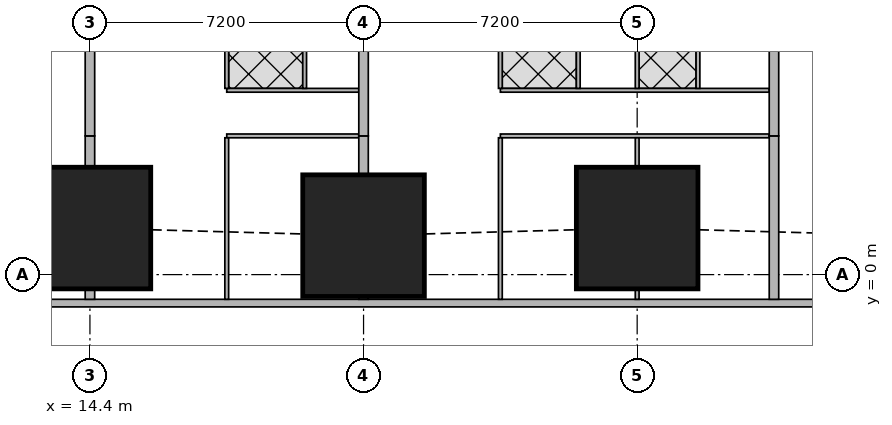
"""IFC4 building model, lengths in metres.
Left out: names, types, materials, properties, quantities, classifications, styles, units other than length and angle.
Written with IfcOpenShell. Run it as: python <this file> out.ifc"""

import sys

from ifc_helpers import new_model, si_unit, direction, frame, frame_2d, origin, origin_2d, place, context, subcontext, project, spatial, rectangle, extrude, element, fill, save


model = new_model("IFC4")
c1 = context("Model", 3, precision=1e-05, world=origin(), true_north=direction((0.0, 1.0)))
c2 = subcontext(c1, "Body", "Model", "MODEL_VIEW")
j1 = project(units=[si_unit("LENGTHUNIT", "METRE"), si_unit("PLANEANGLEUNIT", "RADIAN")], contexts=[c1])
p1 = place(None, origin())
s1 = spatial("IfcSite", under=j1, at=p1, CompositionType="ELEMENT")
p2 = place(p1, origin())
s2 = spatial("IfcBuilding", under=s1, at=p2, CompositionType="ELEMENT")
p3 = place(p2, frame((0.0, 0.0, 20.0)))
s3 = spatial("IfcBuildingStorey", under=s2, at=p3, CompositionType="ELEMENT", Elevation=20.0)
p4 = place(p3, frame((14.4, 1.225, 0.0), z_axis=(0.0, 0.0, 1.0), x_axis=(1.0, 0.0, 0.0)))
e1 = element("IfcColumn", 1, at=p4, inside=s3, PredefinedType="COLUMN", context=c2, shape_type="SweptSolid", body=[
    extrude(rectangle(XDim=3.2, YDim=3.2, at=origin_2d()), origin(), (0.0, 0.0, 1.0), 3.75),
])
p5 = place(p3, frame((21.6, 1.025, -0.3), z_axis=(0.0, 0.0, 1.0), x_axis=(1.0, 0.0, 0.0)))
e2 = element("IfcColumn", 2, at=p5, inside=s3, PredefinedType="COLUMN", context=c2, shape_type="SweptSolid", body=[
    extrude(rectangle(XDim=3.2, YDim=3.2, at=origin_2d()), origin(), (0.0, 0.0, 1.0), 4.05),
])
p6 = place(p3, frame((28.8, 1.225, 0.0), z_axis=(0.0, 0.0, 1.0), x_axis=(1.0, 0.0, 0.0)))
e3 = element("IfcColumn", 3, at=p6, inside=s3, PredefinedType="COLUMN", context=c2, shape_type="SweptSolid", body=[
    extrude(rectangle(XDim=3.2, YDim=3.2, at=origin_2d()), origin(), (0.0, 0.0, 1.0), 3.75),
])
p7 = place(p3, frame((2.163, -0.75, 0.0), z_axis=(0.0, 0.0, 1.0), x_axis=(1.0, 0.0, 0.0)))
e4 = element("IfcWall", 4, at=p7, inside=s3, PredefinedType="SOLIDWALL", context=c2, shape_type="SweptSolid", body=[
    extrude(rectangle(XDim=45.628, YDim=0.2, at=frame_2d((22.814, 0.0))), origin(), (0.0, 0.0, 1.0), 3.5),
])
p8 = place(p7, frame((9.537, 0.0, 0.9)))
e5 = element("IfcOpeningElement", 5, at=p8, cuts=e4, PredefinedType="OPENING", context=c2, shape_type="SweptSolid", body=[
    extrude(rectangle(XDim=1.8, YDim=1.5, at=frame_2d((0.9, 0.75))), frame((0.0, 0.11, 0.0), z_axis=(0.0, -1.0, 0.0), x_axis=(1.0, 0.0, 0.0)), (0.0, 0.0, 1.0), 0.22),
])
p9 = place(p7, frame((13.137, 0.0, 0.9)))
e6 = element("IfcOpeningElement", 6, at=p9, cuts=e4, PredefinedType="OPENING", context=c2, shape_type="SweptSolid", body=[
    extrude(rectangle(XDim=1.8, YDim=1.5, at=frame_2d((0.9, 0.75))), frame((0.0, 0.11, 0.0), z_axis=(0.0, -1.0, 0.0), x_axis=(1.0, 0.0, 0.0)), (0.0, 0.0, 1.0), 0.22),
])
p10 = place(p7, frame((16.737, 0.0, 0.9)))
e7 = element("IfcOpeningElement", 7, at=p10, cuts=e4, PredefinedType="OPENING", context=c2, shape_type="SweptSolid", body=[
    extrude(rectangle(XDim=1.8, YDim=1.5, at=frame_2d((0.9, 0.75))), frame((0.0, 0.11, 0.0), z_axis=(0.0, -1.0, 0.0), x_axis=(1.0, 0.0, 0.0)), (0.0, 0.0, 1.0), 0.22),
])
p11 = place(p7, frame((20.337, 0.0, 0.9)))
e8 = element("IfcOpeningElement", 8, at=p11, cuts=e4, PredefinedType="OPENING", context=c2, shape_type="SweptSolid", body=[
    extrude(rectangle(XDim=1.8, YDim=1.5, at=frame_2d((0.9, 0.75))), frame((0.0, 0.11, 0.0), z_axis=(0.0, -1.0, 0.0), x_axis=(1.0, 0.0, 0.0)), (0.0, 0.0, 1.0), 0.22),
])
p12 = place(p7, frame((23.937, 0.0, 0.9)))
e9 = element("IfcOpeningElement", 9, at=p12, cuts=e4, PredefinedType="OPENING", context=c2, shape_type="SweptSolid", body=[
    extrude(rectangle(XDim=1.8, YDim=1.5, at=frame_2d((0.9, 0.75))), frame((0.0, 0.11, 0.0), z_axis=(0.0, -1.0, 0.0), x_axis=(1.0, 0.0, 0.0)), (0.0, 0.0, 1.0), 0.22),
])
p13 = place(p7, frame((27.537, 0.0, 0.9)))
e10 = element("IfcOpeningElement", 10, at=p13, cuts=e4, PredefinedType="OPENING", context=c2, shape_type="SweptSolid", body=[
    extrude(rectangle(XDim=1.8, YDim=1.5, at=frame_2d((0.9, 0.75))), frame((0.0, 0.11, 0.0), z_axis=(0.0, -1.0, 0.0), x_axis=(1.0, 0.0, 0.0)), (0.0, 0.0, 1.0), 0.22),
])
p14 = place(p7, frame((31.137, 0.0, 0.9)))
e11 = element("IfcOpeningElement", 11, at=p14, cuts=e4, PredefinedType="OPENING", context=c2, shape_type="SweptSolid", body=[
    extrude(rectangle(XDim=1.8, YDim=1.5, at=frame_2d((0.9, 0.75))), frame((0.0, 0.11, 0.0), z_axis=(0.0, -1.0, 0.0), x_axis=(1.0, 0.0, 0.0)), (0.0, 0.0, 1.0), 0.22),
])
p15 = place(p7, frame((34.737, 0.0, 0.9)))
e12 = element("IfcOpeningElement", 12, at=p15, cuts=e4, PredefinedType="OPENING", context=c2, shape_type="SweptSolid", body=[
    extrude(rectangle(XDim=1.8, YDim=1.5, at=frame_2d((0.9, 0.75))), frame((0.0, 0.11, 0.0), z_axis=(0.0, -1.0, 0.0), x_axis=(1.0, 0.0, 0.0)), (0.0, 0.0, 1.0), 0.22),
])
p16 = place(p3, frame((21.475, 3.65, 0.0), z_axis=(0.0, 0.0, 1.0), x_axis=(-1.0, 0.0, 0.0)))
e13 = element("IfcWall", 13, at=p16, inside=s3, PredefinedType="PARTITIONING", context=c2, shape_type="SweptSolid", body=[
    extrude(rectangle(XDim=3.475, YDim=0.1, at=frame_2d((1.738, 0.0))), origin(), (0.0, 0.0, 1.0), 3.5),
])
p17 = place(p16, frame((2.375, 0.0, 0.0)))
e14 = element("IfcOpeningElement", 14, at=p17, cuts=e13, PredefinedType="OPENING", context=c2, shape_type="SweptSolid", body=[
    extrude(rectangle(XDim=0.9, YDim=2.1, at=frame_2d((0.45, 1.05))), frame((0.0, 0.06, 0.0), z_axis=(0.0, -1.0, 0.0), x_axis=(1.0, 0.0, 0.0)), (0.0, 0.0, 1.0), 0.12),
])
p18 = place(p3, frame((21.475, 4.85, 0.0), z_axis=(0.0, 0.0, 1.0), x_axis=(-1.0, 0.0, 0.0)))
e15 = element("IfcWall", 15, at=p18, inside=s3, PredefinedType="PARTITIONING", context=c2, shape_type="SweptSolid", body=[
    extrude(rectangle(XDim=3.475, YDim=0.1, at=frame_2d((1.738, 0.0))), origin(), (0.0, 0.0, 1.0), 3.5),
])
p19 = place(p18, frame((2.0, 0.0, 0.0)))
e16 = element("IfcOpeningElement", 16, at=p19, cuts=e15, PredefinedType="OPENING", context=c2, shape_type="SweptSolid", body=[
    extrude(rectangle(XDim=0.9, YDim=2.1, at=frame_2d((0.45, 1.05))), frame((0.0, 0.06, 0.0), z_axis=(0.0, -1.0, 0.0), x_axis=(1.0, 0.0, 0.0)), (0.0, 0.0, 1.0), 0.12),
])
p20 = place(p18, frame((0.2, 0.0, 0.0)))
e17 = element("IfcOpeningElement", 17, at=p20, cuts=e15, PredefinedType="OPENING", context=c2, shape_type="SweptSolid", body=[
    extrude(rectangle(XDim=0.9, YDim=2.1, at=frame_2d((0.45, 1.05))), frame((0.0, 0.06, 0.0), z_axis=(0.0, -1.0, 0.0), x_axis=(1.0, 0.0, 0.0)), (0.0, 0.0, 1.0), 0.12),
])
p21 = place(p3, frame((18.0, -0.65, 0.0), z_axis=(0.0, 0.0, 1.0), x_axis=(0.0, 1.0, 0.0)))
e18 = element("IfcWall", 18, at=p21, inside=s3, PredefinedType="PARTITIONING", context=c2, shape_type="SweptSolid", body=[
    extrude(rectangle(XDim=4.25, YDim=0.1, at=frame_2d((2.125, 0.0))), origin(), (0.0, 0.0, 1.0), 2.05),
])
for number, where, z_axis, x_axis in (
    (19, (18.0, 4.9, 0.0), (0.0, 0.0, 1.0), (0.0, 1.0, 0.0)),
    (20, (20.05, 4.9, 0.0), (0.0, 0.0, 1.0), (0.0, 1.0, 0.0)),
):
    element("IfcWall", number, at=place(p3, frame(where, z_axis=z_axis, x_axis=x_axis)), inside=s3, PredefinedType="PARTITIONING", context=c2, shape_type="SweptSolid", body=[
        extrude(rectangle(XDim=3.525, YDim=0.1, at=frame_2d((1.763, 0.0))), origin(), (0.0, 0.0, 1.0), 3.5),
    ])
p22 = place(p3, frame((14.4, -0.65, 0.0), z_axis=(0.0, 0.0, 1.0), x_axis=(0.0, 1.0, 0.0)))
e21 = element("IfcWall", 21, at=p22, inside=s3, PredefinedType="SOLIDWALL", context=c2, shape_type="SweptSolid", body=[
    extrude(rectangle(XDim=0.274, YDim=0.25, at=frame_2d((0.137, 0.0))), origin(), (0.0, 0.0, 1.0), 2.05),
])
p23 = place(p3, frame((14.4, 2.826, 0.0), z_axis=(0.0, 0.0, 1.0), x_axis=(0.0, 1.0, 0.0)))
e22 = element("IfcWall", 22, at=p23, inside=s3, PredefinedType="SOLIDWALL", context=c2, shape_type="SweptSolid", body=[
    extrude(rectangle(XDim=0.824, YDim=0.25, at=frame_2d((0.412, 0.0))), origin(), (0.0, 0.0, 1.0), 2.05),
])
p24 = place(p3, frame((14.4, 3.65, 0.0), z_axis=(0.0, 0.0, 1.0), x_axis=(0.0, 1.0, 0.0)))
e23 = element("IfcWall", 23, at=p24, inside=s3, PredefinedType="SOLIDWALL", context=c2, shape_type="SweptSolid", body=[
    extrude(rectangle(XDim=2.949, YDim=0.25, at=frame_2d((1.475, 0.0))), origin(), (0.0, 0.0, 1.0), 3.5),
])
p25 = place(p3, frame((32.275, 3.65, 0.0), z_axis=(0.0, 0.0, 1.0), x_axis=(-1.0, 0.0, 0.0)))
e24 = element("IfcWall", 24, at=p25, inside=s3, PredefinedType="PARTITIONING", context=c2, shape_type="SweptSolid", body=[
    extrude(rectangle(XDim=7.075, YDim=0.1, at=frame_2d((3.538, 0.0))), origin(), (0.0, 0.0, 1.0), 3.5),
])
p26 = place(p25, frame((5.975, 0.0, 0.0)))
e25 = element("IfcOpeningElement", 25, at=p26, cuts=e24, PredefinedType="OPENING", context=c2, shape_type="SweptSolid", body=[
    extrude(rectangle(XDim=0.9, YDim=2.1, at=frame_2d((0.45, 1.05))), frame((0.0, 0.06, 0.0), z_axis=(0.0, -1.0, 0.0), x_axis=(1.0, 0.0, 0.0)), (0.0, 0.0, 1.0), 0.12),
])
p27 = place(p25, frame((0.95, 0.0, 0.0)))
e26 = element("IfcOpeningElement", 26, at=p27, cuts=e24, PredefinedType="OPENING", context=c2, shape_type="SweptSolid", body=[
    extrude(rectangle(XDim=0.9, YDim=2.1, at=frame_2d((0.45, 1.05))), frame((0.0, 0.06, 0.0), z_axis=(0.0, -1.0, 0.0), x_axis=(1.0, 0.0, 0.0)), (0.0, 0.0, 1.0), 0.12),
])
p28 = place(p3, frame((32.275, 4.85, 0.0), z_axis=(0.0, 0.0, 1.0), x_axis=(-1.0, 0.0, 0.0)))
e27 = element("IfcWall", 27, at=p28, inside=s3, PredefinedType="PARTITIONING", context=c2, shape_type="SweptSolid", body=[
    extrude(rectangle(XDim=7.075, YDim=0.1, at=frame_2d((3.538, 0.0))), origin(), (0.0, 0.0, 1.0), 3.5),
])
p29 = place(p28, frame((5.6, 0.0, 0.0)))
e28 = element("IfcOpeningElement", 28, at=p29, cuts=e27, PredefinedType="OPENING", context=c2, shape_type="SweptSolid", body=[
    extrude(rectangle(XDim=0.9, YDim=2.1, at=frame_2d((0.45, 1.05))), frame((0.0, 0.06, 0.0), z_axis=(0.0, -1.0, 0.0), x_axis=(1.0, 0.0, 0.0)), (0.0, 0.0, 1.0), 0.12),
])
p30 = place(p28, frame((2.225, 0.0, 0.0)))
e29 = element("IfcOpeningElement", 29, at=p30, cuts=e27, PredefinedType="OPENING", context=c2, shape_type="SweptSolid", body=[
    extrude(rectangle(XDim=0.9, YDim=2.1, at=frame_2d((0.45, 1.05))), frame((0.0, 0.06, 0.0), z_axis=(0.0, -1.0, 0.0), x_axis=(1.0, 0.0, 0.0)), (0.0, 0.0, 1.0), 0.12),
])
p31 = place(p28, frame((3.8, 0.0, 0.0)))
e30 = element("IfcOpeningElement", 30, at=p31, cuts=e27, PredefinedType="OPENING", context=c2, shape_type="SweptSolid", body=[
    extrude(rectangle(XDim=0.9, YDim=2.1, at=frame_2d((0.45, 1.05))), frame((0.0, 0.06, 0.0), z_axis=(0.0, -1.0, 0.0), x_axis=(1.0, 0.0, 0.0)), (0.0, 0.0, 1.0), 0.12),
])
p32 = place(p28, frame((0.425, 0.0, 0.0)))
e31 = element("IfcOpeningElement", 31, at=p32, cuts=e27, PredefinedType="OPENING", context=c2, shape_type="SweptSolid", body=[
    extrude(rectangle(XDim=0.9, YDim=2.1, at=frame_2d((0.45, 1.05))), frame((0.0, 0.06, 0.0), z_axis=(0.0, -1.0, 0.0), x_axis=(1.0, 0.0, 0.0)), (0.0, 0.0, 1.0), 0.12),
])
p33 = place(p3, frame((25.2, -0.65, 0.0), z_axis=(0.0, 0.0, 1.0), x_axis=(0.0, 1.0, 0.0)))
e32 = element("IfcWall", 32, at=p33, inside=s3, PredefinedType="PARTITIONING", context=c2, shape_type="SweptSolid", body=[
    extrude(rectangle(XDim=4.25, YDim=0.1, at=frame_2d((2.125, 0.0))), origin(), (0.0, 0.0, 1.0), 2.05),
])
p34 = place(p3, frame((28.8, -0.65, 0.0), z_axis=(0.0, 0.0, 1.0), x_axis=(0.0, 1.0, 0.0)))
e33 = element("IfcWall", 33, at=p34, inside=s3, PredefinedType="PARTITIONING", context=c2, shape_type="SweptSolid", body=[
    extrude(rectangle(XDim=0.274, YDim=0.1, at=frame_2d((0.137, 0.0))), origin(), (0.0, 0.0, 1.0), 3.5),
])
p35 = place(p3, frame((28.8, 2.826, 0.0), z_axis=(0.0, 0.0, 1.0), x_axis=(0.0, 1.0, 0.0)))
e34 = element("IfcWall", 34, at=p35, inside=s3, PredefinedType="PARTITIONING", context=c2, shape_type="SweptSolid", body=[
    extrude(rectangle(XDim=0.774, YDim=0.1, at=frame_2d((0.387, 0.0))), origin(), (0.0, 0.0, 1.0), 3.5),
])
p36 = place(p3, frame((25.2, 4.9, 0.0), z_axis=(0.0, 0.0, 1.0), x_axis=(0.0, 1.0, 0.0)))
e35 = element("IfcWall", 35, at=p36, inside=s3, PredefinedType="PARTITIONING", context=c2, shape_type="SweptSolid", body=[
    extrude(rectangle(XDim=3.525, YDim=0.1, at=frame_2d((1.763, 0.0))), origin(), (0.0, 0.0, 1.0), 3.5),
])
p37 = place(p3, frame((28.8, 4.9, 0.0), z_axis=(0.0, 0.0, 1.0), x_axis=(0.0, 1.0, 0.0)))
e36 = element("IfcWall", 36, at=p37, inside=s3, PredefinedType="PARTITIONING", context=c2, shape_type="SweptSolid", body=[
    extrude(rectangle(XDim=1.699, YDim=0.1, at=frame_2d((0.85, 0.0))), origin(), (0.0, 0.0, 1.0), 3.5),
])
for number, where, z_axis, x_axis in (
    (37, (27.25, 4.9, 0.0), (0.0, 0.0, 1.0), (0.0, 1.0, 0.0)),
    (38, (30.4, 4.9, 0.0), (0.0, 0.0, 1.0), (0.0, 1.0, 0.0)),
):
    element("IfcWall", number, at=place(p3, frame(where, z_axis=z_axis, x_axis=x_axis)), inside=s3, PredefinedType="PARTITIONING", context=c2, shape_type="SweptSolid", body=[
        extrude(rectangle(XDim=3.525, YDim=0.1, at=frame_2d((1.763, 0.0))), origin(), (0.0, 0.0, 1.0), 3.5),
    ])
p38 = place(p3, frame((21.6, -0.65, 0.0), z_axis=(0.0, 0.0, 1.0), x_axis=(0.0, 1.0, 0.0)))
e39 = element("IfcWall", 39, at=p38, inside=s3, PredefinedType="SOLIDWALL", context=c2, shape_type="SweptSolid", body=[
    extrude(rectangle(XDim=0.074, YDim=0.25, at=frame_2d((0.037, 0.0))), origin(), (0.0, 0.0, 1.0), 2.05),
])
p39 = place(p3, frame((21.6, 2.626, 0.0), z_axis=(0.0, 0.0, 1.0), x_axis=(0.0, 1.0, 0.0)))
e40 = element("IfcWall", 40, at=p39, inside=s3, PredefinedType="SOLIDWALL", context=c2, shape_type="SweptSolid", body=[
    extrude(rectangle(XDim=1.024, YDim=0.25, at=frame_2d((0.512, 0.0))), origin(), (0.0, 0.0, 1.0), 2.05),
])
p40 = place(p3, frame((21.6, 3.65, 0.0), z_axis=(0.0, 0.0, 1.0), x_axis=(0.0, 1.0, 0.0)))
e41 = element("IfcWall", 41, at=p40, inside=s3, PredefinedType="SOLIDWALL", context=c2, shape_type="SweptSolid", body=[
    extrude(rectangle(XDim=2.949, YDim=0.25, at=frame_2d((1.475, 0.0))), origin(), (0.0, 0.0, 1.0), 3.5),
])
p41 = place(p3, frame((32.4, -0.65, 0.0), z_axis=(0.0, 0.0, 1.0), x_axis=(0.0, 1.0, 0.0)))
e42 = element("IfcWall", 42, at=p41, inside=s3, PredefinedType="SOLIDWALL", context=c2, shape_type="SweptSolid", body=[
    extrude(rectangle(XDim=4.3, YDim=0.25, at=frame_2d((2.15, 0.0))), origin(), (0.0, 0.0, 1.0), 2.05),
])
p42 = place(p3, frame((32.4, 3.65, 0.0), z_axis=(0.0, 0.0, 1.0), x_axis=(0.0, 1.0, 0.0)))
e43 = element("IfcWall", 43, at=p42, inside=s3, PredefinedType="SOLIDWALL", context=c2, shape_type="SweptSolid", body=[
    extrude(rectangle(XDim=4.775, YDim=0.25, at=frame_2d((2.388, 0.0))), origin(), (0.0, 0.0, 1.0), 3.5),
])
p43 = place(p8, origin())
e44 = element("IfcWindow", 44, at=p43, inside=s3, PartitioningType="SINGLE_PANEL", PredefinedType="WINDOW", context=c2, shape_type="SweptSolid", body=[
    extrude(rectangle(XDim=1.8, YDim=1.5, at=frame_2d((0.9, 0.75))), frame((0.0, 0.03, 0.0), z_axis=(0.0, -1.0, 0.0), x_axis=(1.0, 0.0, 0.0)), (0.0, 0.0, 1.0), 0.06),
])
fill(e5, e44)
p44 = place(p9, origin())
e45 = element("IfcWindow", 45, at=p44, inside=s3, PartitioningType="SINGLE_PANEL", PredefinedType="WINDOW", context=c2, shape_type="SweptSolid", body=[
    extrude(rectangle(XDim=1.8, YDim=1.5, at=frame_2d((0.9, 0.75))), frame((0.0, 0.03, 0.0), z_axis=(0.0, -1.0, 0.0), x_axis=(1.0, 0.0, 0.0)), (0.0, 0.0, 1.0), 0.06),
])
fill(e6, e45)
p45 = place(p10, origin())
e46 = element("IfcWindow", 46, at=p45, inside=s3, PartitioningType="SINGLE_PANEL", PredefinedType="WINDOW", context=c2, shape_type="SweptSolid", body=[
    extrude(rectangle(XDim=1.8, YDim=1.5, at=frame_2d((0.9, 0.75))), frame((0.0, 0.03, 0.0), z_axis=(0.0, -1.0, 0.0), x_axis=(1.0, 0.0, 0.0)), (0.0, 0.0, 1.0), 0.06),
])
fill(e7, e46)
p46 = place(p11, origin())
e47 = element("IfcWindow", 47, at=p46, inside=s3, PartitioningType="SINGLE_PANEL", PredefinedType="WINDOW", context=c2, shape_type="SweptSolid", body=[
    extrude(rectangle(XDim=1.8, YDim=1.5, at=frame_2d((0.9, 0.75))), frame((0.0, 0.03, 0.0), z_axis=(0.0, -1.0, 0.0), x_axis=(1.0, 0.0, 0.0)), (0.0, 0.0, 1.0), 0.06),
])
fill(e8, e47)
p47 = place(p12, origin())
e48 = element("IfcWindow", 48, at=p47, inside=s3, PartitioningType="SINGLE_PANEL", PredefinedType="WINDOW", context=c2, shape_type="SweptSolid", body=[
    extrude(rectangle(XDim=1.8, YDim=1.5, at=frame_2d((0.9, 0.75))), frame((0.0, 0.03, 0.0), z_axis=(0.0, -1.0, 0.0), x_axis=(1.0, 0.0, 0.0)), (0.0, 0.0, 1.0), 0.06),
])
fill(e9, e48)
p48 = place(p13, origin())
e49 = element("IfcWindow", 49, at=p48, inside=s3, PartitioningType="SINGLE_PANEL", PredefinedType="WINDOW", context=c2, shape_type="SweptSolid", body=[
    extrude(rectangle(XDim=1.8, YDim=1.5, at=frame_2d((0.9, 0.75))), frame((0.0, 0.03, 0.0), z_axis=(0.0, -1.0, 0.0), x_axis=(1.0, 0.0, 0.0)), (0.0, 0.0, 1.0), 0.06),
])
fill(e10, e49)
p49 = place(p14, origin())
e50 = element("IfcWindow", 50, at=p49, inside=s3, PartitioningType="SINGLE_PANEL", PredefinedType="WINDOW", context=c2, shape_type="SweptSolid", body=[
    extrude(rectangle(XDim=1.8, YDim=1.5, at=frame_2d((0.9, 0.75))), frame((0.0, 0.03, 0.0), z_axis=(0.0, -1.0, 0.0), x_axis=(1.0, 0.0, 0.0)), (0.0, 0.0, 1.0), 0.06),
])
fill(e11, e50)
p50 = place(p17, origin())
e51 = element("IfcDoor", 51, at=p50, inside=s3, OperationType="SINGLE_SWING_RIGHT", PredefinedType="DOOR", context=c2, shape_type="SweptSolid", body=[
    extrude(rectangle(XDim=0.9, YDim=2.1, at=frame_2d((0.45, 1.05))), frame((0.0, 0.025, 0.0), z_axis=(0.0, -1.0, 0.0), x_axis=(1.0, 0.0, 0.0)), (0.0, 0.0, 1.0), 0.05),
])
fill(e14, e51)
p51 = place(p19, origin())
e52 = element("IfcDoor", 52, at=p51, inside=s3, OperationType="SINGLE_SWING_LEFT", PredefinedType="DOOR", context=c2, shape_type="SweptSolid", body=[
    extrude(rectangle(XDim=0.9, YDim=2.1, at=frame_2d((0.45, 1.05))), frame((0.0, 0.025, 0.0), z_axis=(0.0, -1.0, 0.0), x_axis=(1.0, 0.0, 0.0)), (0.0, 0.0, 1.0), 0.05),
])
fill(e16, e52)
p52 = place(p20, origin())
e53 = element("IfcDoor", 53, at=p52, inside=s3, OperationType="SINGLE_SWING_RIGHT", PredefinedType="DOOR", context=c2, shape_type="SweptSolid", body=[
    extrude(rectangle(XDim=0.9, YDim=2.1, at=frame_2d((0.45, 1.05))), frame((0.0, 0.025, 0.0), z_axis=(0.0, -1.0, 0.0), x_axis=(1.0, 0.0, 0.0)), (0.0, 0.0, 1.0), 0.05),
])
fill(e17, e53)
p53 = place(p26, origin())
e54 = element("IfcDoor", 54, at=p53, inside=s3, OperationType="SINGLE_SWING_RIGHT", PredefinedType="DOOR", context=c2, shape_type="SweptSolid", body=[
    extrude(rectangle(XDim=0.9, YDim=2.1, at=frame_2d((0.45, 1.05))), frame((0.0, 0.025, 0.0), z_axis=(0.0, -1.0, 0.0), x_axis=(1.0, 0.0, 0.0)), (0.0, 0.0, 1.0), 0.05),
])
fill(e25, e54)
p54 = place(p27, origin())
e55 = element("IfcDoor", 55, at=p54, inside=s3, OperationType="SINGLE_SWING_LEFT", PredefinedType="DOOR", context=c2, shape_type="SweptSolid", body=[
    extrude(rectangle(XDim=0.9, YDim=2.1, at=frame_2d((0.45, 1.05))), frame((0.0, 0.025, 0.0), z_axis=(0.0, -1.0, 0.0), x_axis=(1.0, 0.0, 0.0)), (0.0, 0.0, 1.0), 0.05),
])
fill(e26, e55)
p55 = place(p29, origin())
e56 = element("IfcDoor", 56, at=p55, inside=s3, OperationType="SINGLE_SWING_LEFT", PredefinedType="DOOR", context=c2, shape_type="SweptSolid", body=[
    extrude(rectangle(XDim=0.9, YDim=2.1, at=frame_2d((0.45, 1.05))), frame((0.0, 0.025, 0.0), z_axis=(0.0, -1.0, 0.0), x_axis=(1.0, 0.0, 0.0)), (0.0, 0.0, 1.0), 0.05),
])
fill(e28, e56)
p56 = place(p30, origin())
e57 = element("IfcDoor", 57, at=p56, inside=s3, OperationType="SINGLE_SWING_RIGHT", PredefinedType="DOOR", context=c2, shape_type="SweptSolid", body=[
    extrude(rectangle(XDim=0.9, YDim=2.1, at=frame_2d((0.45, 1.05))), frame((0.0, 0.025, 0.0), z_axis=(0.0, -1.0, 0.0), x_axis=(1.0, 0.0, 0.0)), (0.0, 0.0, 1.0), 0.05),
])
fill(e29, e57)
p57 = place(p31, origin())
e58 = element("IfcDoor", 58, at=p57, inside=s3, OperationType="SINGLE_SWING_RIGHT", PredefinedType="DOOR", context=c2, shape_type="SweptSolid", body=[
    extrude(rectangle(XDim=0.9, YDim=2.1, at=frame_2d((0.45, 1.05))), frame((0.0, 0.025, 0.0), z_axis=(0.0, -1.0, 0.0), x_axis=(1.0, 0.0, 0.0)), (0.0, 0.0, 1.0), 0.05),
])
fill(e30, e58)
p58 = place(p32, origin())
e59 = element("IfcDoor", 59, at=p58, inside=s3, OperationType="SINGLE_SWING_RIGHT", PredefinedType="DOOR", context=c2, shape_type="SweptSolid", body=[
    extrude(rectangle(XDim=0.9, YDim=2.1, at=frame_2d((0.45, 1.05))), frame((0.0, 0.025, 0.0), z_axis=(0.0, -1.0, 0.0), x_axis=(1.0, 0.0, 0.0)), (0.0, 0.0, 1.0), 0.05),
])
fill(e31, e59)
save(model, sys.argv[1])
